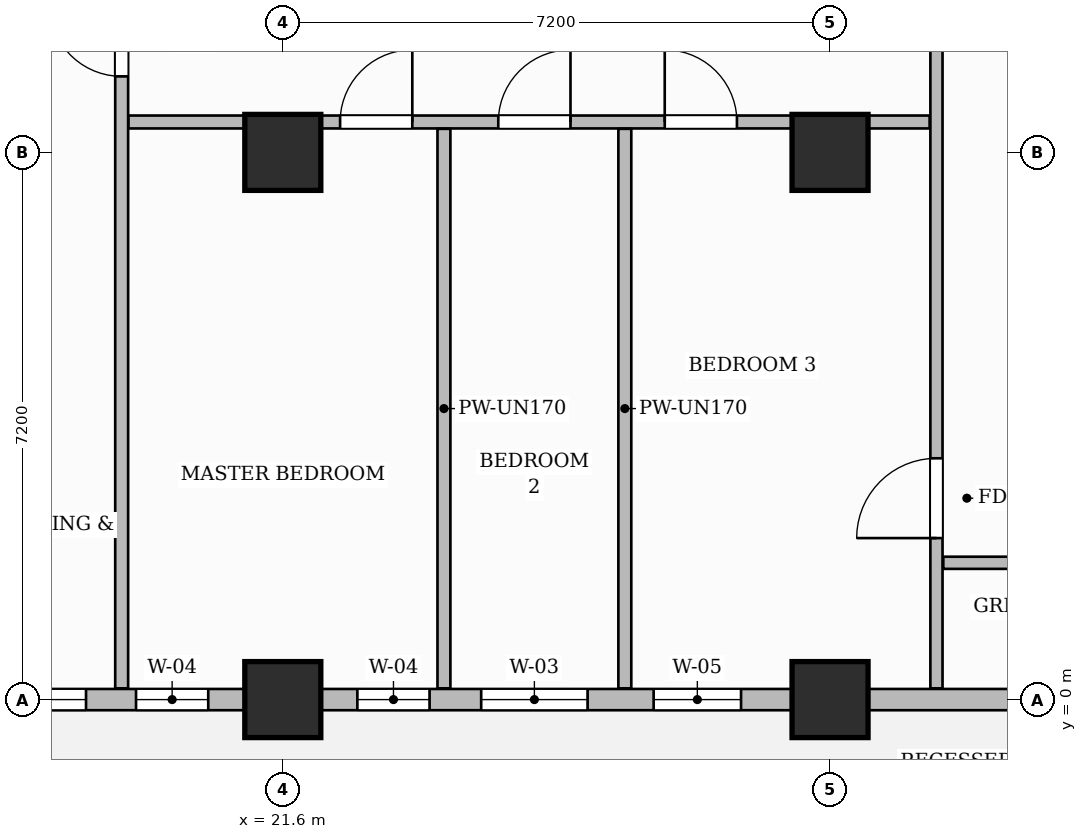
"""IFC4 building model, lengths in metres.
Left out: names, types, materials, properties, quantities, classifications, styles, units other than length and angle.
Written with IfcOpenShell. Run it as: python <this file> out.ifc"""

import sys

from ifc_helpers import new_model, si_unit, direction, frame, frame_2d, origin, origin_2d, place, context, subcontext, project, spatial, rectangle, extrude, source, transform, mapped, element, fill, save


model = new_model("IFC4")
c1 = context("Model", 3, precision=1e-05, world=origin(), true_north=direction((0.0, 1.0)))
c2 = subcontext(c1, "Body", "Model", "MODEL_VIEW")
j1 = project(units=[si_unit("LENGTHUNIT", "METRE"), si_unit("PLANEANGLEUNIT", "RADIAN")], contexts=[c1])
p1 = place(None, origin())
s1 = spatial("IfcSite", under=j1, at=p1, CompositionType="ELEMENT")
p2 = place(p1, origin())
s2 = spatial("IfcBuilding", under=s1, at=p2, CompositionType="ELEMENT")
p3 = place(p2, frame((0.0, 0.0, 173.4)))
s3 = spatial("IfcBuildingStorey", under=s2, at=p3, CompositionType="ELEMENT", Elevation=173.4)
m1 = source(origin(), c2, "Body", "SweptSolid", [
    extrude(rectangle(XDim=1.0, YDim=1.0, at=origin_2d()), origin(), (0.0, 0.0, 1.0), 3.85),
])
for number, where, z_axis, x_axis in (
    (1, (21.6, 0.0, 0.0), (0.0, 0.0, 1.0), (1.0, 0.0, 0.0)),
    (2, (21.6, 7.2, 0.0), (0.0, 0.0, 1.0), (1.0, 0.0, 0.0)),
    (3, (28.8, 0.0, 0.0), (0.0, 0.0, 1.0), (1.0, 0.0, 0.0)),
    (4, (28.8, 7.2, 0.0), (0.0, 0.0, 1.0), (1.0, 0.0, 0.0)),
):
    element("IfcColumn", number, at=place(p3, frame(where, z_axis=z_axis, x_axis=x_axis)), inside=s3, PredefinedType="COLUMN", context=c2, shape_type="MappedRepresentation", body=[
        mapped(m1, transform((0.0, 0.0, 0.0), scale=1.0)),
    ])
p4 = place(p3, frame((30.2, 0.148, 0.0), z_axis=(0.0, 0.0, 1.0), x_axis=(0.0, 1.0, 0.0)))
e5 = element("IfcWall", 5, at=p4, inside=s3, PredefinedType="PARTITIONING", context=c2, shape_type="SweptSolid", body=[
    extrude(rectangle(XDim=9.512, YDim=0.16, at=frame_2d((4.756, 0.0))), origin(), (0.0, 0.0, 1.0), 3.6),
])
p5 = place(p4, frame((1.977, 0.0, 0.0)))
e6 = element("IfcOpeningElement", 6, at=p5, cuts=e5, PredefinedType="OPENING", context=c2, shape_type="SweptSolid", body=[
    extrude(rectangle(XDim=1.05, YDim=2.15, at=frame_2d((0.525, 1.075))), frame((0.0, 0.09, 0.0), z_axis=(0.0, -1.0, 0.0), x_axis=(1.0, 0.0, 0.0)), (0.0, 0.0, 1.0), 0.18),
])
p6 = place(p3, frame((30.29, 1.8, 0.0), z_axis=(0.0, 0.0, 1.0), x_axis=(1.0, 0.0, 0.0)))
e7 = element("IfcWall", 7, at=p6, inside=s3, PredefinedType="PARTITIONING", context=c2, shape_type="SweptSolid", body=[
    extrude(rectangle(XDim=19.37, YDim=0.16, at=frame_2d((9.685, 0.0))), origin(), (0.0, 0.0, 1.0), 3.6),
])
p7 = place(p6, frame((9.735, 0.0, 0.0)))
e8 = element("IfcOpeningElement", 8, at=p7, cuts=e7, PredefinedType="OPENING", context=c2, shape_type="SweptSolid", body=[
    extrude(rectangle(XDim=0.95, YDim=2.15, at=frame_2d((0.475, 1.075))), frame((0.0, 0.09, 0.0), z_axis=(0.0, -1.0, 0.0), x_axis=(1.0, 0.0, 0.0)), (0.0, 0.0, 1.0), 0.18),
])
p8 = place(p3, frame((19.48, 0.148, 0.0), z_axis=(0.0, 0.0, 1.0), x_axis=(0.0, 1.0, 0.0)))
e9 = element("IfcWall", 9, at=p8, inside=s3, PredefinedType="PARTITIONING", context=c2, shape_type="SweptSolid", body=[
    extrude(rectangle(XDim=9.512, YDim=0.17, at=frame_2d((4.756, 0.0))), origin(), (0.0, 0.0, 1.0), 3.6),
])
p9 = place(p8, frame((8.052, 0.0, 0.0)))
e10 = element("IfcOpeningElement", 10, at=p9, cuts=e9, PredefinedType="OPENING", context=c2, shape_type="SweptSolid", body=[
    extrude(rectangle(XDim=0.95, YDim=2.15, at=frame_2d((0.475, 1.075))), frame((0.0, 0.095, 0.0), z_axis=(0.0, -1.0, 0.0), x_axis=(1.0, 0.0, 0.0)), (0.0, 0.0, 1.0), 0.19),
])
p10 = place(p3, frame((19.57, 7.6, 0.0), z_axis=(0.0, 0.0, 1.0), x_axis=(1.0, 0.0, 0.0)))
e11 = element("IfcWall", 11, at=p10, inside=s3, PredefinedType="PARTITIONING", context=c2, shape_type="SweptSolid", body=[
    extrude(rectangle(XDim=10.54, YDim=0.17, at=frame_2d((5.27, 0.0))), origin(), (0.0, 0.0, 1.0), 3.6),
])
p11 = place(p10, frame((2.784, 0.0, 0.0)))
e12 = element("IfcOpeningElement", 12, at=p11, cuts=e11, PredefinedType="OPENING", context=c2, shape_type="SweptSolid", body=[
    extrude(rectangle(XDim=0.95, YDim=2.15, at=frame_2d((0.475, 1.075))), frame((0.0, 0.095, 0.0), z_axis=(0.0, -1.0, 0.0), x_axis=(1.0, 0.0, 0.0)), (0.0, 0.0, 1.0), 0.19),
])
p12 = place(p10, frame((4.865, 0.0, 0.0)))
e13 = element("IfcOpeningElement", 13, at=p12, cuts=e11, PredefinedType="OPENING", context=c2, shape_type="SweptSolid", body=[
    extrude(rectangle(XDim=0.95, YDim=2.15, at=frame_2d((0.475, 1.075))), frame((0.0, 0.095, 0.0), z_axis=(0.0, -1.0, 0.0), x_axis=(1.0, 0.0, 0.0)), (0.0, 0.0, 1.0), 0.19),
])
p13 = place(p10, frame((7.055, 0.0, 0.0)))
e14 = element("IfcOpeningElement", 14, at=p13, cuts=e11, PredefinedType="OPENING", context=c2, shape_type="SweptSolid", body=[
    extrude(rectangle(XDim=0.95, YDim=2.15, at=frame_2d((0.475, 1.075))), frame((0.0, 0.095, 0.0), z_axis=(0.0, -1.0, 0.0), x_axis=(1.0, 0.0, 0.0)), (0.0, 0.0, 1.0), 0.19),
])
for number, where, z_axis, x_axis in (
    (15, (23.72, 0.148, 0.0), (0.0, 0.0, 1.0), (0.0, 1.0, 0.0)),
    (16, (26.1, 0.148, 0.0), (0.0, 0.0, 1.0), (0.0, 1.0, 0.0)),
):
    element("IfcWall", number, at=place(p3, frame(where, z_axis=z_axis, x_axis=x_axis)), inside=s3, PredefinedType="PARTITIONING", context=c2, shape_type="SweptSolid", body=[
        extrude(rectangle(XDim=7.362, YDim=0.17, at=frame_2d((3.681, 0.0))), origin(), (0.0, 0.0, 1.0), 3.6),
    ])
p14 = place(p3, frame((14.4, 0.0, 0.0), z_axis=(0.0, 0.0, 1.0), x_axis=(1.0, 0.0, 0.0)))
e17 = element("IfcWall", 17, at=p14, inside=s3, PredefinedType="SOLIDWALL", context=c2, shape_type="SweptSolid", body=[
    extrude(rectangle(XDim=35.4, YDim=0.28, at=frame_2d((17.7, 0.0))), origin(), (0.0, 0.0, 1.0), 3.085),
])
p15 = place(p14, frame((0.85, 0.0, 0.0)))
e18 = element("IfcOpeningElement", 18, at=p15, cuts=e17, PredefinedType="OPENING", context=c2, shape_type="SweptSolid", body=[
    extrude(rectangle(XDim=1.2, YDim=2.2, at=frame_2d((0.6, 1.1))), frame((0.0, 0.15, 0.0), z_axis=(0.0, -1.0, 0.0), x_axis=(1.0, 0.0, 0.0)), (0.0, 0.0, 1.0), 0.3),
])
p16 = place(p14, frame((2.811, 0.0, 0.8)))
e19 = element("IfcOpeningElement", 19, at=p16, cuts=e17, PredefinedType="OPENING", context=c2, shape_type="SweptSolid", body=[
    extrude(rectangle(XDim=1.8, YDim=1.85, at=frame_2d((0.9, 0.925))), frame((0.0, 0.15, 0.0), z_axis=(0.0, -1.0, 0.0), x_axis=(1.0, 0.0, 0.0)), (0.0, 0.0, 1.0), 0.3),
])
p17 = place(p14, frame((5.269, 0.0, 0.8)))
e20 = element("IfcOpeningElement", 20, at=p17, cuts=e17, PredefinedType="OPENING", context=c2, shape_type="SweptSolid", body=[
    extrude(rectangle(XDim=0.95, YDim=1.75, at=frame_2d((0.475, 0.875))), frame((0.0, 0.15, 0.0), z_axis=(0.0, -1.0, 0.0), x_axis=(1.0, 0.0, 0.0)), (0.0, 0.0, 1.0), 0.3),
])
p18 = place(p14, frame((8.181, 0.0, 0.8)))
e21 = element("IfcOpeningElement", 21, at=p18, cuts=e17, PredefinedType="OPENING", context=c2, shape_type="SweptSolid", body=[
    extrude(rectangle(XDim=0.95, YDim=1.75, at=frame_2d((0.475, 0.875))), frame((0.0, 0.15, 0.0), z_axis=(0.0, -1.0, 0.0), x_axis=(1.0, 0.0, 0.0)), (0.0, 0.0, 1.0), 0.3),
])
p19 = place(p14, frame((9.81, 0.0, 0.8)))
e22 = element("IfcOpeningElement", 22, at=p19, cuts=e17, PredefinedType="OPENING", context=c2, shape_type="SweptSolid", body=[
    extrude(rectangle(XDim=1.4, YDim=1.85, at=frame_2d((0.7, 0.925))), frame((0.0, 0.15, 0.0), z_axis=(0.0, -1.0, 0.0), x_axis=(1.0, 0.0, 0.0)), (0.0, 0.0, 1.0), 0.3),
])
p20 = place(p14, frame((12.079, 0.0, 0.8)))
e23 = element("IfcOpeningElement", 23, at=p20, cuts=e17, PredefinedType="OPENING", context=c2, shape_type="SweptSolid", body=[
    extrude(rectangle(XDim=1.15, YDim=1.8, at=frame_2d((0.575, 0.9))), frame((0.0, 0.15, 0.0), z_axis=(0.0, -1.0, 0.0), x_axis=(1.0, 0.0, 0.0)), (0.0, 0.0, 1.0), 0.3),
])
p21 = place(p14, frame((16.804, 0.0, 0.8)))
e24 = element("IfcOpeningElement", 24, at=p21, cuts=e17, PredefinedType="OPENING", context=c2, shape_type="SweptSolid", body=[
    extrude(rectangle(XDim=1.8, YDim=1.85, at=frame_2d((0.9, 0.925))), frame((0.0, 0.15, 0.0), z_axis=(0.0, -1.0, 0.0), x_axis=(1.0, 0.0, 0.0)), (0.0, 0.0, 1.0), 0.3),
])
p22 = place(p14, frame((21.725, 0.0, 0.8)))
e25 = element("IfcOpeningElement", 25, at=p22, cuts=e17, PredefinedType="OPENING", context=c2, shape_type="SweptSolid", body=[
    extrude(rectangle(XDim=1.8, YDim=1.85, at=frame_2d((0.9, 0.925))), frame((0.0, 0.15, 0.0), z_axis=(0.0, -1.0, 0.0), x_axis=(1.0, 0.0, 0.0)), (0.0, 0.0, 1.0), 0.3),
])
p23 = place(p14, frame((24.475, 0.0, 0.8)))
e26 = element("IfcOpeningElement", 26, at=p23, cuts=e17, PredefinedType="OPENING", context=c2, shape_type="SweptSolid", body=[
    extrude(rectangle(XDim=1.8, YDim=1.85, at=frame_2d((0.9, 0.925))), frame((0.0, 0.15, 0.0), z_axis=(0.0, -1.0, 0.0), x_axis=(1.0, 0.0, 0.0)), (0.0, 0.0, 1.0), 0.3),
])
p24 = place(p14, frame((29.075, 0.0, 0.8)))
e27 = element("IfcOpeningElement", 27, at=p24, cuts=e17, PredefinedType="OPENING", context=c2, shape_type="SweptSolid", body=[
    extrude(rectangle(XDim=1.8, YDim=1.85, at=frame_2d((0.9, 0.925))), frame((0.0, 0.15, 0.0), z_axis=(0.0, -1.0, 0.0), x_axis=(1.0, 0.0, 0.0)), (0.0, 0.0, 1.0), 0.3),
])
p25 = place(p14, frame((32.125, 0.0, 0.8)))
e28 = element("IfcOpeningElement", 28, at=p25, cuts=e17, PredefinedType="OPENING", context=c2, shape_type="SweptSolid", body=[
    extrude(rectangle(XDim=1.8, YDim=1.85, at=frame_2d((0.9, 0.925))), frame((0.0, 0.15, 0.0), z_axis=(0.0, -1.0, 0.0), x_axis=(1.0, 0.0, 0.0)), (0.0, 0.0, 1.0), 0.3),
])
m2 = source(origin(), c2, "Body", "SweptSolid", [
    extrude(rectangle(XDim=1.05, YDim=2.15, at=frame_2d((0.525, 1.075))), frame((0.0, 0.025, 0.0), z_axis=(0.0, -1.0, 0.0), x_axis=(1.0, 0.0, 0.0)), (0.0, 0.0, 1.0), 0.05),
])
p26 = place(p5, origin())
e29 = element("IfcDoor", 29, at=p26, inside=s3, OperationType="SINGLE_SWING_LEFT", PredefinedType="DOOR", context=c2, shape_type="MappedRepresentation", body=[
    mapped(m2, transform((0.0, 0.0, 0.0), scale=1.0)),
])
fill(e6, e29)
m3 = source(origin(), c2, "Body", "SweptSolid", [
    extrude(rectangle(XDim=0.95, YDim=2.15, at=frame_2d((0.475, 1.075))), frame((0.0, 0.025, 0.0), z_axis=(0.0, -1.0, 0.0), x_axis=(1.0, 0.0, 0.0)), (0.0, 0.0, 1.0), 0.05),
])
p27 = place(p9, origin())
e30 = element("IfcDoor", 30, at=p27, inside=s3, OperationType="SINGLE_SWING_RIGHT", PredefinedType="DOOR", context=c2, shape_type="MappedRepresentation", body=[
    mapped(m3, transform((0.0, 0.0, 0.0), scale=1.0)),
])
fill(e10, e30)
p28 = place(p11, origin())
e31 = element("IfcDoor", 31, at=p28, inside=s3, OperationType="SINGLE_SWING_RIGHT", PredefinedType="DOOR", context=c2, shape_type="MappedRepresentation", body=[
    mapped(m3, transform((0.0, 0.0, 0.0), scale=1.0)),
])
fill(e12, e31)
p29 = place(p12, origin())
e32 = element("IfcDoor", 32, at=p29, inside=s3, OperationType="SINGLE_SWING_RIGHT", PredefinedType="DOOR", context=c2, shape_type="MappedRepresentation", body=[
    mapped(m3, transform((0.0, 0.0, 0.0), scale=1.0)),
])
fill(e13, e32)
p30 = place(p13, origin())
e33 = element("IfcDoor", 33, at=p30, inside=s3, OperationType="SINGLE_SWING_LEFT", PredefinedType="DOOR", context=c2, shape_type="MappedRepresentation", body=[
    mapped(m3, transform((0.0, 0.0, 0.0), scale=1.0)),
])
fill(e14, e33)
m4 = source(origin(), c2, "Body", "SweptSolid", [
    extrude(rectangle(XDim=1.8, YDim=1.85, at=frame_2d((0.9, 0.925))), frame((0.0, 0.03, 0.0), z_axis=(0.0, -1.0, 0.0), x_axis=(1.0, 0.0, 0.0)), (0.0, 0.0, 1.0), 0.06),
])
p31 = place(p16, origin())
e34 = element("IfcWindow", 34, at=p31, inside=s3, PartitioningType="DOUBLE_PANEL_VERTICAL", PredefinedType="WINDOW", context=c2, shape_type="MappedRepresentation", body=[
    mapped(m4, transform((0.0, 0.0, 0.0), scale=1.0)),
])
fill(e19, e34)
m5 = source(origin(), c2, "Body", "SweptSolid", [
    extrude(rectangle(XDim=0.95, YDim=1.75, at=frame_2d((0.475, 0.875))), frame((0.0, 0.03, 0.0), z_axis=(0.0, -1.0, 0.0), x_axis=(1.0, 0.0, 0.0)), (0.0, 0.0, 1.0), 0.06),
])
p32 = place(p17, origin())
e35 = element("IfcWindow", 35, at=p32, inside=s3, PartitioningType="SINGLE_PANEL", PredefinedType="WINDOW", context=c2, shape_type="MappedRepresentation", body=[
    mapped(m5, transform((0.0, 0.0, 0.0), scale=1.0)),
])
fill(e20, e35)
p33 = place(p18, origin())
e36 = element("IfcWindow", 36, at=p33, inside=s3, PartitioningType="SINGLE_PANEL", PredefinedType="WINDOW", context=c2, shape_type="MappedRepresentation", body=[
    mapped(m5, transform((0.0, 0.0, 0.0), scale=1.0)),
])
fill(e21, e36)
m6 = source(origin(), c2, "Body", "SweptSolid", [
    extrude(rectangle(XDim=1.4, YDim=1.85, at=frame_2d((0.7, 0.925))), frame((0.0, 0.03, 0.0), z_axis=(0.0, -1.0, 0.0), x_axis=(1.0, 0.0, 0.0)), (0.0, 0.0, 1.0), 0.06),
])
p34 = place(p19, origin())
e37 = element("IfcWindow", 37, at=p34, inside=s3, PartitioningType="SINGLE_PANEL", PredefinedType="WINDOW", context=c2, shape_type="MappedRepresentation", body=[
    mapped(m6, transform((0.0, 0.0, 0.0), scale=1.0)),
])
fill(e22, e37)
m7 = source(origin(), c2, "Body", "SweptSolid", [
    extrude(rectangle(XDim=1.15, YDim=1.8, at=frame_2d((0.575, 0.9))), frame((0.0, 0.03, 0.0), z_axis=(0.0, -1.0, 0.0), x_axis=(1.0, 0.0, 0.0)), (0.0, 0.0, 1.0), 0.06),
])
p35 = place(p20, origin())
e38 = element("IfcWindow", 38, at=p35, inside=s3, PartitioningType="SINGLE_PANEL", PredefinedType="WINDOW", context=c2, shape_type="MappedRepresentation", body=[
    mapped(m7, transform((0.0, 0.0, 0.0), scale=1.0)),
])
fill(e23, e38)
save(model, sys.argv[1])
